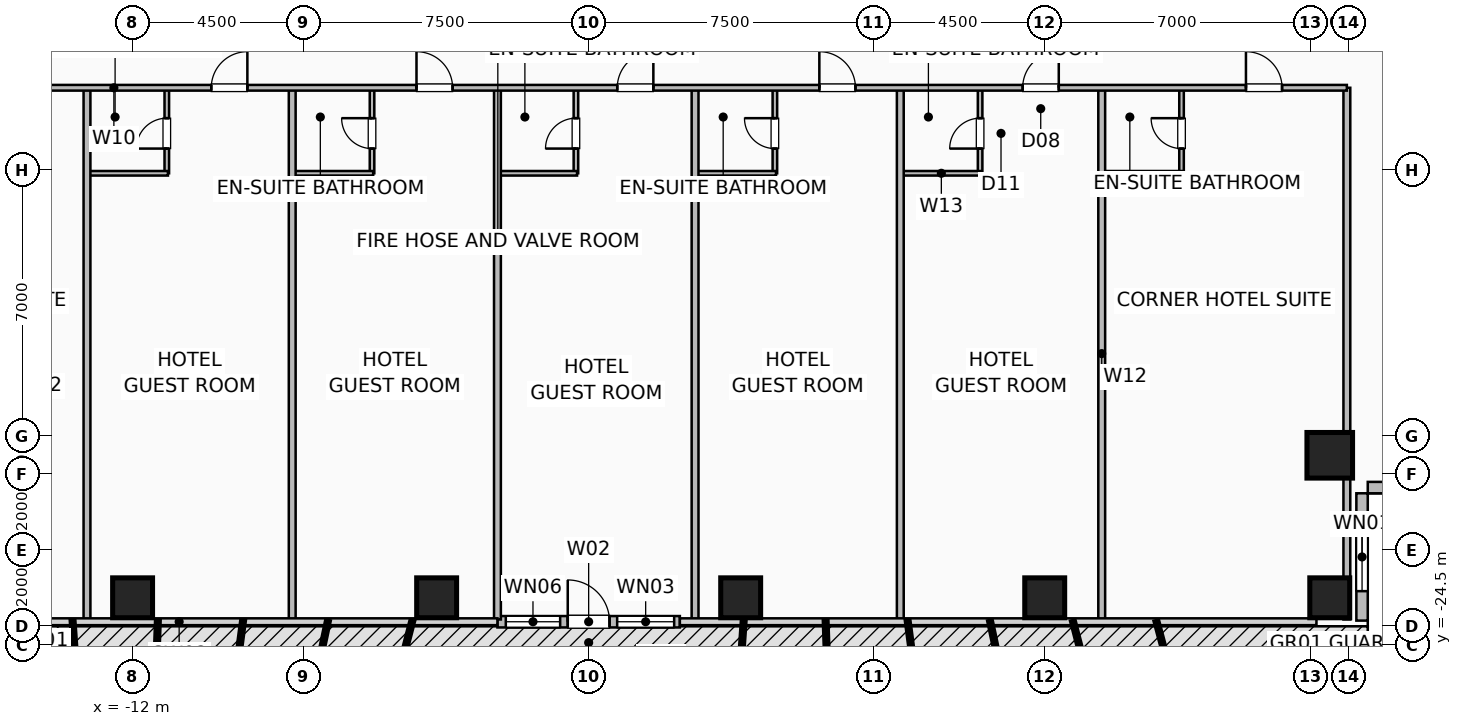
"""IFC4 building model, lengths in metres.
Left out: names, types, materials, properties, quantities, classifications, styles, units other than length and angle.
Written with IfcOpenShell. Run it as: python <this file> out.ifc"""

import sys

from ifc_helpers import new_model, si_unit, direction, frame, frame_2d, origin, origin_2d, place, context, subcontext, project, spatial, rectangle, hollow_rectangle, extrude, element, fill, save


model = new_model("IFC4")
c1 = context("Model", 3, precision=1e-05, world=origin(), true_north=direction((0.0, 1.0)))
c2 = subcontext(c1, "Body", "Model", "MODEL_VIEW")
j1 = project(units=[si_unit("LENGTHUNIT", "METRE"), si_unit("PLANEANGLEUNIT", "RADIAN")], contexts=[c1])
p1 = place(None, origin())
s1 = spatial("IfcSite", under=j1, at=p1, CompositionType="ELEMENT")
p2 = place(p1, origin())
s2 = spatial("IfcBuilding", under=s1, at=p2, CompositionType="ELEMENT")
p3 = place(p2, frame((0.0, 0.0, 27.0)))
s3 = spatial("IfcBuildingStorey", under=s2, at=p3, CompositionType="ELEMENT", Elevation=27.0)
p4 = place(p3, frame((-12.0, -23.25, -0.4), z_axis=(0.0, 0.0, 1.0), x_axis=(1.0, 0.0, 0.0)))
e1 = element("IfcColumn", 1, at=p4, inside=s3, PredefinedType="COLUMN", context=c2, shape_type="SweptSolid", body=[
    extrude(hollow_rectangle(XDim=1.05, YDim=1.05, WallThickness=0.05, at=origin_2d()), origin(), (0.0, 0.0, 1.0), 3.9),
])
for number, where, z_axis, x_axis in (
    (2, (-4.0, -23.25, 0.0), (0.0, 0.0, 1.0), (1.0, 0.0, 0.0)),
    (3, (4.0, -23.25, 0.0), (0.0, 0.0, 1.0), (1.0, 0.0, 0.0)),
):
    element("IfcColumn", number, at=place(p3, frame(where, z_axis=z_axis, x_axis=x_axis)), inside=s3, PredefinedType="COLUMN", context=c2, shape_type="SweptSolid", body=[
        extrude(hollow_rectangle(XDim=1.05, YDim=1.05, WallThickness=0.05, at=origin_2d()), origin(), (0.0, 0.0, 1.0), 3.5),
    ])
p5 = place(p3, frame((12.0, -23.25, -0.4), z_axis=(0.0, 0.0, 1.0), x_axis=(1.0, 0.0, 0.0)))
e4 = element("IfcColumn", 4, at=p5, inside=s3, PredefinedType="COLUMN", context=c2, shape_type="SweptSolid", body=[
    extrude(hollow_rectangle(XDim=1.05, YDim=1.05, WallThickness=0.05, at=origin_2d()), origin(), (0.0, 0.0, 1.0), 3.9),
])
p6 = place(p3, frame((19.5, -23.25, 0.0), z_axis=(0.0, 0.0, 1.0), x_axis=(1.0, 0.0, 0.0)))
e5 = element("IfcColumn", 5, at=p6, inside=s3, PredefinedType="COLUMN", context=c2, shape_type="SweptSolid", body=[
    extrude(hollow_rectangle(XDim=1.05, YDim=1.05, WallThickness=0.05, at=origin_2d()), origin(), (0.0, 0.0, 1.0), 3.5),
])
p7 = place(p3, frame((19.5, -19.5, 0.0), z_axis=(0.0, 0.0, 1.0), x_axis=(1.0, 0.0, 0.0)))
e6 = element("IfcColumn", 6, at=p7, inside=s3, PredefinedType="COLUMN", context=c2, shape_type="SweptSolid", body=[
    extrude(hollow_rectangle(XDim=1.2, YDim=1.2, WallThickness=0.055, at=origin_2d()), origin(), (0.0, 0.0, 1.0), 3.5),
])
p8 = place(p3, frame((-2.4, -23.88, 0.0), z_axis=(0.0, 0.0, 1.0), x_axis=(1.0, 0.0, 0.0)))
e7 = element("IfcWall", 7, at=p8, inside=s3, PredefinedType="SOLIDWALL", context=c2, shape_type="SweptSolid", body=[
    extrude(rectangle(XDim=4.8, YDim=0.3, at=frame_2d((2.4, 0.0))), origin(), (0.0, 0.0, 1.0), 3.25),
])
p9 = place(p8, frame((1.85, 0.0, 0.0)))
e8 = element("IfcOpeningElement", 8, at=p9, cuts=e7, PredefinedType="OPENING", context=c2, shape_type="SweptSolid", body=[
    extrude(rectangle(XDim=1.1, YDim=2.2, at=frame_2d((0.55, 1.1))), frame((0.0, 0.16, 0.0), z_axis=(0.0, -1.0, 0.0), x_axis=(1.0, 0.0, 0.0)), (0.0, 0.0, 1.0), 0.32),
])
p10 = place(p8, frame((0.22, 0.0, 0.85)))
e9 = element("IfcOpeningElement", 9, at=p10, cuts=e7, PredefinedType="OPENING", context=c2, shape_type="SweptSolid", body=[
    extrude(rectangle(XDim=1.43, YDim=1.8, at=frame_2d((0.715, 0.9))), frame((0.0, 0.16, 0.0), z_axis=(0.0, -1.0, 0.0), x_axis=(1.0, 0.0, 0.0)), (0.0, 0.0, 1.0), 0.32),
])
p11 = place(p8, frame((3.15, 0.0, 0.85)))
e10 = element("IfcOpeningElement", 10, at=p11, cuts=e7, PredefinedType="OPENING", context=c2, shape_type="SweptSolid", body=[
    extrude(rectangle(XDim=1.5, YDim=1.8, at=frame_2d((0.75, 0.9))), frame((0.0, 0.16, 0.0), z_axis=(0.0, -1.0, 0.0), x_axis=(1.0, 0.0, 0.0)), (0.0, 0.0, 1.0), 0.32),
])
p12 = place(p3, frame((20.35, -23.85, 0.0), z_axis=(0.0, 0.0, 1.0), x_axis=(0.0, 1.0, 0.0)))
e11 = element("IfcWall", 11, at=p12, inside=s3, PredefinedType="SOLIDWALL", context=c2, shape_type="SweptSolid", body=[
    extrude(rectangle(XDim=3.35, YDim=0.3, at=frame_2d((1.675, 0.0))), origin(), (0.0, 0.0, 1.0), 3.25),
])
p13 = place(p12, frame((0.775, 0.0, 0.9)))
e12 = element("IfcOpeningElement", 12, at=p13, cuts=e11, PredefinedType="OPENING", context=c2, shape_type="SweptSolid", body=[
    extrude(rectangle(XDim=1.8, YDim=1.8, at=frame_2d((0.9, 0.9))), frame((0.0, 0.16, 0.0), z_axis=(0.0, -1.0, 0.0), x_axis=(1.0, 0.0, 0.0)), (0.0, 0.0, 1.0), 0.32),
])
p14 = place(p3, frame((23.85, -20.35, 0.0), z_axis=(0.0, 0.0, 1.0), x_axis=(-1.0, 0.0, 0.0)))
e13 = element("IfcWall", 13, at=p14, inside=s3, PredefinedType="SOLIDWALL", context=c2, shape_type="SweptSolid", body=[
    extrude(rectangle(XDim=3.35, YDim=0.3, at=frame_2d((1.675, 0.0))), origin(), (0.0, 0.0, 1.0), 3.25),
])
p15 = place(p3, frame((-11.1, -12.08, 0.0), z_axis=(0.0, 0.0, 1.0), x_axis=(0.0, 1.0, 0.0)))
e14 = element("IfcWall", 14, at=p15, inside=s3, PredefinedType="PLUMBINGWALL", context=c2, shape_type="SweptSolid", body=[
    extrude(rectangle(XDim=2.25, YDim=0.12, at=frame_2d((1.125, 0.0))), origin(), (0.0, 0.0, 1.0), 3.25),
])
p16 = place(p15, frame((0.65, 0.0, 0.0)))
e15 = element("IfcOpeningElement", 15, at=p16, cuts=e14, PredefinedType="OPENING", context=c2, shape_type="SweptSolid", body=[
    extrude(rectangle(XDim=0.8, YDim=2.05, at=frame_2d((0.4, 1.025))), frame((0.0, 0.07, 0.0), z_axis=(0.0, -1.0, 0.0), x_axis=(1.0, 0.0, 0.0)), (0.0, 0.0, 1.0), 0.14),
])
p17 = place(p3, frame((-13.17, -12.08, 0.0), z_axis=(0.0, 0.0, 1.0), x_axis=(1.0, 0.0, 0.0)))
e16 = element("IfcWall", 16, at=p17, inside=s3, PredefinedType="PLUMBINGWALL", context=c2, shape_type="SweptSolid", body=[
    extrude(rectangle(XDim=2.1, YDim=0.12, at=frame_2d((1.05, 0.0))), origin(), (0.0, 0.0, 1.0), 3.25),
])
p18 = place(p3, frame((-5.7, -12.08, 0.0), z_axis=(0.0, 0.0, 1.0), x_axis=(0.0, 1.0, 0.0)))
e17 = element("IfcWall", 17, at=p18, inside=s3, PredefinedType="PLUMBINGWALL", context=c2, shape_type="SweptSolid", body=[
    extrude(rectangle(XDim=2.25, YDim=0.12, at=frame_2d((1.125, 0.0))), origin(), (0.0, 0.0, 1.0), 3.25),
])
p19 = place(p18, frame((0.65, 0.0, 0.0)))
e18 = element("IfcOpeningElement", 18, at=p19, cuts=e17, PredefinedType="OPENING", context=c2, shape_type="SweptSolid", body=[
    extrude(rectangle(XDim=0.8, YDim=2.05, at=frame_2d((0.4, 1.025))), frame((0.0, 0.07, 0.0), z_axis=(0.0, -1.0, 0.0), x_axis=(1.0, 0.0, 0.0)), (0.0, 0.0, 1.0), 0.14),
])
p20 = place(p3, frame((-7.77, -12.08, 0.0), z_axis=(0.0, 0.0, 1.0), x_axis=(1.0, 0.0, 0.0)))
e19 = element("IfcWall", 19, at=p20, inside=s3, PredefinedType="PLUMBINGWALL", context=c2, shape_type="SweptSolid", body=[
    extrude(rectangle(XDim=2.1, YDim=0.12, at=frame_2d((1.05, 0.0))), origin(), (0.0, 0.0, 1.0), 3.25),
])
p21 = place(p3, frame((-0.335, -12.08, 0.0), z_axis=(0.0, 0.0, 1.0), x_axis=(0.0, 1.0, 0.0)))
e20 = element("IfcWall", 20, at=p21, inside=s3, PredefinedType="PLUMBINGWALL", context=c2, shape_type="SweptSolid", body=[
    extrude(rectangle(XDim=2.25, YDim=0.12, at=frame_2d((1.125, 0.0))), origin(), (0.0, 0.0, 1.0), 3.25),
])
p22 = place(p21, frame((0.65, 0.0, 0.0)))
e21 = element("IfcOpeningElement", 21, at=p22, cuts=e20, PredefinedType="OPENING", context=c2, shape_type="SweptSolid", body=[
    extrude(rectangle(XDim=0.8, YDim=2.05, at=frame_2d((0.4, 1.025))), frame((0.0, 0.07, 0.0), z_axis=(0.0, -1.0, 0.0), x_axis=(1.0, 0.0, 0.0)), (0.0, 0.0, 1.0), 0.14),
])
p23 = place(p3, frame((-2.37, -12.08, 0.0), z_axis=(0.0, 0.0, 1.0), x_axis=(1.0, 0.0, 0.0)))
e22 = element("IfcWall", 22, at=p23, inside=s3, PredefinedType="PLUMBINGWALL", context=c2, shape_type="SweptSolid", body=[
    extrude(rectangle(XDim=2.065, YDim=0.12, at=frame_2d((1.033, 0.0))), origin(), (0.0, 0.0, 1.0), 3.25),
])
p24 = place(p3, frame((4.9, -12.08, 0.0), z_axis=(0.0, 0.0, 1.0), x_axis=(0.0, 1.0, 0.0)))
e23 = element("IfcWall", 23, at=p24, inside=s3, PredefinedType="PLUMBINGWALL", context=c2, shape_type="SweptSolid", body=[
    extrude(rectangle(XDim=2.25, YDim=0.12, at=frame_2d((1.125, 0.0))), origin(), (0.0, 0.0, 1.0), 2.818),
])
p25 = place(p24, frame((0.65, 0.0, 0.0)))
e24 = element("IfcOpeningElement", 24, at=p25, cuts=e23, PredefinedType="OPENING", context=c2, shape_type="SweptSolid", body=[
    extrude(rectangle(XDim=0.8, YDim=2.05, at=frame_2d((0.4, 1.025))), frame((0.0, 0.07, 0.0), z_axis=(0.0, -1.0, 0.0), x_axis=(1.0, 0.0, 0.0)), (0.0, 0.0, 1.0), 0.14),
])
p26 = place(p3, frame((2.83, -12.08, 0.0), z_axis=(0.0, 0.0, 1.0), x_axis=(1.0, 0.0, 0.0)))
e25 = element("IfcWall", 25, at=p26, inside=s3, PredefinedType="PLUMBINGWALL", context=c2, shape_type="SweptSolid", body=[
    extrude(rectangle(XDim=2.1, YDim=0.12, at=frame_2d((1.05, 0.0))), origin(), (0.0, 0.0, 1.0), 3.25),
])
p27 = place(p3, frame((10.3, -12.08, 0.0), z_axis=(0.0, 0.0, 1.0), x_axis=(0.0, 1.0, 0.0)))
e26 = element("IfcWall", 26, at=p27, inside=s3, PredefinedType="PLUMBINGWALL", context=c2, shape_type="SweptSolid", body=[
    extrude(rectangle(XDim=2.25, YDim=0.12, at=frame_2d((1.125, 0.0))), origin(), (0.0, 0.0, 1.0), 3.25),
])
p28 = place(p27, frame((0.65, 0.0, 0.0)))
e27 = element("IfcOpeningElement", 27, at=p28, cuts=e26, PredefinedType="OPENING", context=c2, shape_type="SweptSolid", body=[
    extrude(rectangle(XDim=0.8, YDim=2.05, at=frame_2d((0.4, 1.025))), frame((0.0, 0.07, 0.0), z_axis=(0.0, -1.0, 0.0), x_axis=(1.0, 0.0, 0.0)), (0.0, 0.0, 1.0), 0.14),
])
p29 = place(p3, frame((8.23, -12.08, 0.0), z_axis=(0.0, 0.0, 1.0), x_axis=(1.0, 0.0, 0.0)))
e28 = element("IfcWall", 28, at=p29, inside=s3, PredefinedType="PLUMBINGWALL", context=c2, shape_type="SweptSolid", body=[
    extrude(rectangle(XDim=2.1, YDim=0.12, at=frame_2d((1.05, 0.0))), origin(), (0.0, 0.0, 1.0), 3.25),
])
p30 = place(p3, frame((15.6, -12.08, 0.0), z_axis=(0.0, 0.0, 1.0), x_axis=(0.0, 1.0, 0.0)))
e29 = element("IfcWall", 29, at=p30, inside=s3, PredefinedType="PLUMBINGWALL", context=c2, shape_type="SweptSolid", body=[
    extrude(rectangle(XDim=2.25, YDim=0.12, at=frame_2d((1.125, 0.0))), origin(), (0.0, 0.0, 1.0), 3.25),
])
p31 = place(p30, frame((0.65, 0.0, 0.0)))
e30 = element("IfcOpeningElement", 30, at=p31, cuts=e29, PredefinedType="OPENING", context=c2, shape_type="SweptSolid", body=[
    extrude(rectangle(XDim=0.8, YDim=2.05, at=frame_2d((0.4, 1.025))), frame((0.0, 0.07, 0.0), z_axis=(0.0, -1.0, 0.0), x_axis=(1.0, 0.0, 0.0)), (0.0, 0.0, 1.0), 0.14),
])
p32 = place(p3, frame((13.53, -12.08, 0.0), z_axis=(0.0, 0.0, 1.0), x_axis=(1.0, 0.0, 0.0)))
e31 = element("IfcWall", 31, at=p32, inside=s3, PredefinedType="PLUMBINGWALL", context=c2, shape_type="SweptSolid", body=[
    extrude(rectangle(XDim=2.1, YDim=0.12, at=frame_2d((1.05, 0.0))), origin(), (0.0, 0.0, 1.0), 3.25),
])
for number, where, z_axis, x_axis in (
    (32, (-13.2, -23.82, 0.0), (0.0, 0.0, 1.0), (0.0, 1.0, 0.0)),
    (33, (-7.8, -23.82, 0.0), (0.0, 0.0, 1.0), (0.0, 1.0, 0.0)),
    (34, (-2.4, -23.82, 0.0), (0.0, 0.0, 1.0), (0.0, 1.0, 0.0)),
    (35, (2.8, -23.82, 0.0), (0.0, 0.0, 1.0), (0.0, 1.0, 0.0)),
    (36, (8.2, -23.82, 0.0), (0.0, 0.0, 1.0), (0.0, 1.0, 0.0)),
    (37, (13.5, -23.82, 0.0), (0.0, 0.0, 1.0), (0.0, 1.0, 0.0)),
    (38, (19.95, -23.82, 0.0), (0.0, 0.0, 1.0), (0.0, 1.0, 0.0)),
):
    element("IfcWall", number, at=place(p3, frame(where, z_axis=z_axis, x_axis=x_axis)), inside=s3, PredefinedType="PARTITIONING", context=c2, shape_type="SweptSolid", body=[
        extrude(rectangle(XDim=13.99, YDim=0.18, at=frame_2d((6.995, 0.0))), origin(), (0.0, 0.0, 1.0), 3.25),
    ])
p33 = place(p3, frame((-19.95, -9.83, 0.0), z_axis=(0.0, 0.0, 1.0), x_axis=(1.0, 0.0, 0.0)))
e39 = element("IfcWall", 39, at=p33, inside=s3, PredefinedType="PARTITIONING", context=c2, shape_type="SweptSolid", body=[
    extrude(rectangle(XDim=39.9, YDim=0.15, at=frame_2d((19.95, 0.0))), origin(), (0.0, 0.0, 1.0), 3.25),
])
p34 = place(p33, frame((3.945, 0.0, 0.0)))
e40 = element("IfcOpeningElement", 40, at=p34, cuts=e39, PredefinedType="OPENING", context=c2, shape_type="SweptSolid", body=[
    extrude(rectangle(XDim=0.95, YDim=2.08, at=frame_2d((0.475, 1.04))), frame((0.0, 0.085, 0.0), z_axis=(0.0, -1.0, 0.0), x_axis=(1.0, 0.0, 0.0)), (0.0, 0.0, 1.0), 0.17),
])
p35 = place(p33, frame((10.02, 0.0, 0.0)))
e41 = element("IfcOpeningElement", 41, at=p35, cuts=e39, PredefinedType="OPENING", context=c2, shape_type="SweptSolid", body=[
    extrude(rectangle(XDim=0.95, YDim=2.08, at=frame_2d((0.475, 1.04))), frame((0.0, 0.085, 0.0), z_axis=(0.0, -1.0, 0.0), x_axis=(1.0, 0.0, 0.0)), (0.0, 0.0, 1.0), 0.17),
])
p36 = place(p33, frame((15.42, 0.0, 0.0)))
e42 = element("IfcOpeningElement", 42, at=p36, cuts=e39, PredefinedType="OPENING", context=c2, shape_type="SweptSolid", body=[
    extrude(rectangle(XDim=0.95, YDim=2.08, at=frame_2d((0.475, 1.04))), frame((0.0, 0.085, 0.0), z_axis=(0.0, -1.0, 0.0), x_axis=(1.0, 0.0, 0.0)), (0.0, 0.0, 1.0), 0.17),
])
p37 = place(p33, frame((20.702, 0.0, 0.0)))
e43 = element("IfcOpeningElement", 43, at=p37, cuts=e39, PredefinedType="OPENING", context=c2, shape_type="SweptSolid", body=[
    extrude(rectangle(XDim=0.95, YDim=2.08, at=frame_2d((0.475, 1.04))), frame((0.0, 0.085, 0.0), z_axis=(0.0, -1.0, 0.0), x_axis=(1.0, 0.0, 0.0)), (0.0, 0.0, 1.0), 0.17),
])
p38 = place(p33, frame((26.02, 0.0, 0.0)))
e44 = element("IfcOpeningElement", 44, at=p38, cuts=e39, PredefinedType="OPENING", context=c2, shape_type="SweptSolid", body=[
    extrude(rectangle(XDim=0.95, YDim=2.08, at=frame_2d((0.475, 1.04))), frame((0.0, 0.085, 0.0), z_axis=(0.0, -1.0, 0.0), x_axis=(1.0, 0.0, 0.0)), (0.0, 0.0, 1.0), 0.17),
])
p39 = place(p33, frame((31.37, 0.0, 0.0)))
e45 = element("IfcOpeningElement", 45, at=p39, cuts=e39, PredefinedType="OPENING", context=c2, shape_type="SweptSolid", body=[
    extrude(rectangle(XDim=0.95, YDim=2.08, at=frame_2d((0.475, 1.04))), frame((0.0, 0.085, 0.0), z_axis=(0.0, -1.0, 0.0), x_axis=(1.0, 0.0, 0.0)), (0.0, 0.0, 1.0), 0.17),
])
p40 = place(p33, frame((37.245, 0.0, 0.0)))
e46 = element("IfcOpeningElement", 46, at=p40, cuts=e39, PredefinedType="OPENING", context=c2, shape_type="SweptSolid", body=[
    extrude(rectangle(XDim=0.95, YDim=2.08, at=frame_2d((0.475, 1.04))), frame((0.0, 0.085, 0.0), z_axis=(0.0, -1.0, 0.0), x_axis=(1.0, 0.0, 0.0)), (0.0, 0.0, 1.0), 0.17),
])
p41 = place(p9, origin())
e47 = element("IfcDoor", 47, at=p41, inside=s3, OperationType="SINGLE_SWING_LEFT", PredefinedType="DOOR", context=c2, shape_type="SweptSolid", body=[
    extrude(rectangle(XDim=1.1, YDim=2.2, at=frame_2d((0.55, 1.1))), frame((0.0, 0.025, 0.0), z_axis=(0.0, -1.0, 0.0), x_axis=(1.0, 0.0, 0.0)), (0.0, 0.0, 1.0), 0.05),
])
fill(e8, e47)
p42 = place(p10, origin())
e48 = element("IfcWindow", 48, at=p42, inside=s3, PartitioningType="SINGLE_PANEL", PredefinedType="WINDOW", context=c2, shape_type="SweptSolid", body=[
    extrude(rectangle(XDim=1.43, YDim=1.8, at=frame_2d((0.715, 0.9))), frame((0.0, 0.03, 0.0), z_axis=(0.0, -1.0, 0.0), x_axis=(1.0, 0.0, 0.0)), (0.0, 0.0, 1.0), 0.06),
])
fill(e9, e48)
p43 = place(p11, origin())
e49 = element("IfcWindow", 49, at=p43, inside=s3, PartitioningType="SINGLE_PANEL", PredefinedType="WINDOW", context=c2, shape_type="SweptSolid", body=[
    extrude(rectangle(XDim=1.5, YDim=1.8, at=frame_2d((0.75, 0.9))), frame((0.0, 0.03, 0.0), z_axis=(0.0, -1.0, 0.0), x_axis=(1.0, 0.0, 0.0)), (0.0, 0.0, 1.0), 0.06),
])
fill(e10, e49)
p44 = place(p13, origin())
e50 = element("IfcWindow", 50, at=p44, inside=s3, PartitioningType="SINGLE_PANEL", PredefinedType="WINDOW", context=c2, shape_type="SweptSolid", body=[
    extrude(rectangle(XDim=1.8, YDim=1.8, at=frame_2d((0.9, 0.9))), frame((0.0, 0.03, 0.0), z_axis=(0.0, -1.0, 0.0), x_axis=(1.0, 0.0, 0.0)), (0.0, 0.0, 1.0), 0.06),
])
fill(e12, e50)
p45 = place(p16, origin())
e51 = element("IfcDoor", 51, at=p45, inside=s3, OperationType="SINGLE_SWING_LEFT", PredefinedType="DOOR", context=c2, shape_type="SweptSolid", body=[
    extrude(rectangle(XDim=0.8, YDim=2.05, at=frame_2d((0.4, 1.025))), frame((0.0, 0.025, 0.0), z_axis=(0.0, -1.0, 0.0), x_axis=(1.0, 0.0, 0.0)), (0.0, 0.0, 1.0), 0.05),
])
fill(e15, e51)
p46 = place(p19, origin())
e52 = element("IfcDoor", 52, at=p46, inside=s3, OperationType="SINGLE_SWING_RIGHT", PredefinedType="DOOR", context=c2, shape_type="SweptSolid", body=[
    extrude(rectangle(XDim=0.8, YDim=2.05, at=frame_2d((0.4, 1.025))), frame((0.0, 0.025, 0.0), z_axis=(0.0, -1.0, 0.0), x_axis=(1.0, 0.0, 0.0)), (0.0, 0.0, 1.0), 0.05),
])
fill(e18, e52)
p47 = place(p22, origin())
e53 = element("IfcDoor", 53, at=p47, inside=s3, OperationType="SINGLE_SWING_LEFT", PredefinedType="DOOR", context=c2, shape_type="SweptSolid", body=[
    extrude(rectangle(XDim=0.8, YDim=2.05, at=frame_2d((0.4, 1.025))), frame((0.0, 0.025, 0.0), z_axis=(0.0, -1.0, 0.0), x_axis=(1.0, 0.0, 0.0)), (0.0, 0.0, 1.0), 0.05),
])
fill(e21, e53)
p48 = place(p25, origin())
e54 = element("IfcDoor", 54, at=p48, inside=s3, OperationType="SINGLE_SWING_RIGHT", PredefinedType="DOOR", context=c2, shape_type="SweptSolid", body=[
    extrude(rectangle(XDim=0.8, YDim=2.05, at=frame_2d((0.4, 1.025))), frame((0.0, 0.025, 0.0), z_axis=(0.0, -1.0, 0.0), x_axis=(1.0, 0.0, 0.0)), (0.0, 0.0, 1.0), 0.05),
])
fill(e24, e54)
p49 = place(p28, origin())
e55 = element("IfcDoor", 55, at=p49, inside=s3, OperationType="SINGLE_SWING_LEFT", PredefinedType="DOOR", context=c2, shape_type="SweptSolid", body=[
    extrude(rectangle(XDim=0.8, YDim=2.05, at=frame_2d((0.4, 1.025))), frame((0.0, 0.025, 0.0), z_axis=(0.0, -1.0, 0.0), x_axis=(1.0, 0.0, 0.0)), (0.0, 0.0, 1.0), 0.05),
])
fill(e27, e55)
p50 = place(p31, origin())
e56 = element("IfcDoor", 56, at=p50, inside=s3, OperationType="SINGLE_SWING_RIGHT", PredefinedType="DOOR", context=c2, shape_type="SweptSolid", body=[
    extrude(rectangle(XDim=0.8, YDim=2.05, at=frame_2d((0.4, 1.025))), frame((0.0, 0.025, 0.0), z_axis=(0.0, -1.0, 0.0), x_axis=(1.0, 0.0, 0.0)), (0.0, 0.0, 1.0), 0.05),
])
fill(e30, e56)
p51 = place(p35, origin())
e57 = element("IfcDoor", 57, at=p51, inside=s3, OperationType="SINGLE_SWING_RIGHT", PredefinedType="DOOR", context=c2, shape_type="SweptSolid", body=[
    extrude(rectangle(XDim=0.95, YDim=2.08, at=frame_2d((0.475, 1.04))), frame((0.0, 0.025, 0.0), z_axis=(0.0, -1.0, 0.0), x_axis=(1.0, 0.0, 0.0)), (0.0, 0.0, 1.0), 0.05),
])
fill(e41, e57)
p52 = place(p36, origin())
e58 = element("IfcDoor", 58, at=p52, inside=s3, OperationType="SINGLE_SWING_LEFT", PredefinedType="DOOR", context=c2, shape_type="SweptSolid", body=[
    extrude(rectangle(XDim=0.95, YDim=2.08, at=frame_2d((0.475, 1.04))), frame((0.0, 0.025, 0.0), z_axis=(0.0, -1.0, 0.0), x_axis=(1.0, 0.0, 0.0)), (0.0, 0.0, 1.0), 0.05),
])
fill(e42, e58)
p53 = place(p37, origin())
e59 = element("IfcDoor", 59, at=p53, inside=s3, OperationType="SINGLE_SWING_RIGHT", PredefinedType="DOOR", context=c2, shape_type="SweptSolid", body=[
    extrude(rectangle(XDim=0.95, YDim=2.08, at=frame_2d((0.475, 1.04))), frame((0.0, 0.025, 0.0), z_axis=(0.0, -1.0, 0.0), x_axis=(1.0, 0.0, 0.0)), (0.0, 0.0, 1.0), 0.05),
])
fill(e43, e59)
p54 = place(p38, origin())
e60 = element("IfcDoor", 60, at=p54, inside=s3, OperationType="SINGLE_SWING_LEFT", PredefinedType="DOOR", context=c2, shape_type="SweptSolid", body=[
    extrude(rectangle(XDim=0.95, YDim=2.08, at=frame_2d((0.475, 1.04))), frame((0.0, 0.025, 0.0), z_axis=(0.0, -1.0, 0.0), x_axis=(1.0, 0.0, 0.0)), (0.0, 0.0, 1.0), 0.05),
])
fill(e44, e60)
p55 = place(p39, origin())
e61 = element("IfcDoor", 61, at=p55, inside=s3, OperationType="SINGLE_SWING_RIGHT", PredefinedType="DOOR", context=c2, shape_type="SweptSolid", body=[
    extrude(rectangle(XDim=0.95, YDim=2.08, at=frame_2d((0.475, 1.04))), frame((0.0, 0.025, 0.0), z_axis=(0.0, -1.0, 0.0), x_axis=(1.0, 0.0, 0.0)), (0.0, 0.0, 1.0), 0.05),
])
fill(e45, e61)
p56 = place(p40, origin())
e62 = element("IfcDoor", 62, at=p56, inside=s3, OperationType="SINGLE_SWING_LEFT", PredefinedType="DOOR", context=c2, shape_type="SweptSolid", body=[
    extrude(rectangle(XDim=0.95, YDim=2.08, at=frame_2d((0.475, 1.04))), frame((0.0, 0.025, 0.0), z_axis=(0.0, -1.0, 0.0), x_axis=(1.0, 0.0, 0.0)), (0.0, 0.0, 1.0), 0.05),
])
fill(e46, e62)
save(model, sys.argv[1])
